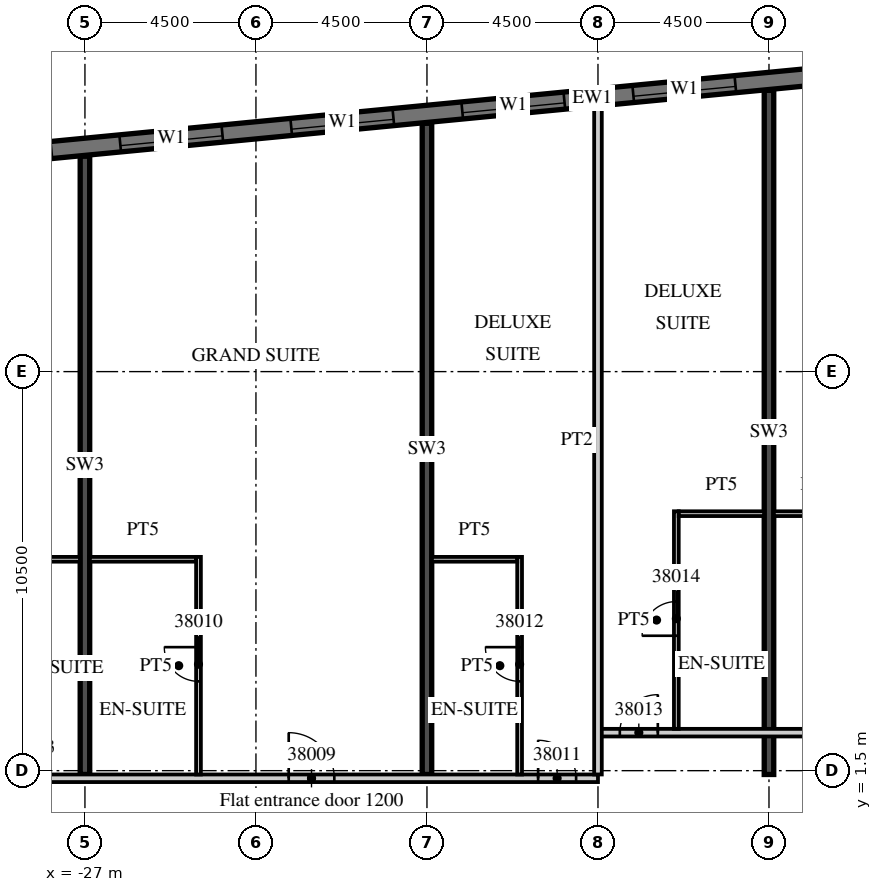
"""IFC4 building model, lengths in metres.
Left out: names, types, materials, properties, quantities, classifications, styles, units other than length and angle.
Written with IfcOpenShell. Run it as: python <this file> out.ifc"""

import sys

from ifc_helpers import new_model, si_unit, direction, frame, frame_2d, origin, place, context, subcontext, project, spatial, rectangle, extrude, element, fill, save


model = new_model("IFC4")
c1 = context("Model", 3, precision=1e-05, world=origin(), true_north=direction((0.0, 1.0)))
c2 = subcontext(c1, "Body", "Model", "MODEL_VIEW")
j1 = project(units=[si_unit("LENGTHUNIT", "METRE"), si_unit("PLANEANGLEUNIT", "RADIAN")], contexts=[c1])
p1 = place(None, origin())
s1 = spatial("IfcSite", under=j1, at=p1, CompositionType="ELEMENT")
p2 = place(p1, origin())
s2 = spatial("IfcBuilding", under=s1, at=p2, CompositionType="ELEMENT")
p3 = place(p2, frame((0.0, 0.0, 166.9)))
s3 = spatial("IfcBuildingStorey", under=s2, at=p3, CompositionType="ELEMENT", Elevation=166.9)
p4 = place(p3, frame((-27.0, 1.4, 0.0), z_axis=(0.0, 0.0, 1.0), x_axis=(0.0, 1.0, 0.0)))
e1 = element("IfcWall", 1, at=p4, inside=s3, PredefinedType="SHEAR", context=c2, shape_type="SweptSolid", body=[
    extrude(rectangle(XDim=16.268, YDim=0.25, at=frame_2d((8.134, 0.0))), origin(), (0.0, 0.0, 1.0), 3.3),
])
p5 = place(p3, frame((-18.0, 1.4, 0.0), z_axis=(0.0, 0.0, 1.0), x_axis=(0.0, 1.0, 0.0)))
e2 = element("IfcWall", 2, at=p5, inside=s3, PredefinedType="SHEAR", context=c2, shape_type="SweptSolid", body=[
    extrude(rectangle(XDim=17.134, YDim=0.25, at=frame_2d((8.567, 0.0))), origin(), (0.0, 0.0, 1.0), 3.3),
])
p6 = place(p3, frame((-9.0, 1.4, 0.0), z_axis=(0.0, 0.0, 1.0), x_axis=(0.0, 1.0, 0.0)))
e3 = element("IfcWall", 3, at=p6, inside=s3, PredefinedType="SHEAR", context=c2, shape_type="SweptSolid", body=[
    extrude(rectangle(XDim=18.001, YDim=0.25, at=frame_2d((9.0, 0.0))), origin(), (0.0, 0.0, 1.0), 3.3),
])
p7 = place(p3, frame((13.521, 21.817, 0.0), z_axis=(0.0, 0.0, 1.0), x_axis=(-0.995396508751, -0.095842529008, 0.0)))
e4 = element("IfcWall", 4, at=p7, inside=s3, PredefinedType="SOLIDWALL", context=c2, shape_type="SweptSolid", body=[
    extrude(rectangle(XDim=54.591, YDim=0.45, at=frame_2d((27.296, 0.0))), origin(), (0.0, 0.0, 1.0), 3.02),
])
p8 = place(p7, frame((0.91, 0.0, 0.45)))
e5 = element("IfcOpeningElement", 5, at=p8, cuts=e4, PredefinedType="OPENING", context=c2, shape_type="SweptSolid", body=[
    extrude(rectangle(XDim=2.7, YDim=2.25, at=frame_2d((1.35, 1.125))), frame((0.0, 0.235, 0.0), z_axis=(0.0, -1.0, 0.0), x_axis=(1.0, 0.0, 0.0)), (0.0, 0.0, 1.0), 0.47),
])
p9 = place(p7, frame((5.431, 0.0, 0.45)))
e6 = element("IfcOpeningElement", 6, at=p9, cuts=e4, PredefinedType="OPENING", context=c2, shape_type="SweptSolid", body=[
    extrude(rectangle(XDim=2.7, YDim=2.25, at=frame_2d((1.35, 1.125))), frame((0.0, 0.235, 0.0), z_axis=(0.0, -1.0, 0.0), x_axis=(1.0, 0.0, 0.0)), (0.0, 0.0, 1.0), 0.47),
])
p10 = place(p7, frame((9.952, 0.0, 0.45)))
e7 = element("IfcOpeningElement", 7, at=p10, cuts=e4, PredefinedType="OPENING", context=c2, shape_type="SweptSolid", body=[
    extrude(rectangle(XDim=2.7, YDim=2.25, at=frame_2d((1.35, 1.125))), frame((0.0, 0.235, 0.0), z_axis=(0.0, -1.0, 0.0), x_axis=(1.0, 0.0, 0.0)), (0.0, 0.0, 1.0), 0.47),
])
p11 = place(p7, frame((14.473, 0.0, 0.45)))
e8 = element("IfcOpeningElement", 8, at=p11, cuts=e4, PredefinedType="OPENING", context=c2, shape_type="SweptSolid", body=[
    extrude(rectangle(XDim=2.7, YDim=2.25, at=frame_2d((1.35, 1.125))), frame((0.0, 0.235, 0.0), z_axis=(0.0, -1.0, 0.0), x_axis=(1.0, 0.0, 0.0)), (0.0, 0.0, 1.0), 0.47),
])
p12 = place(p7, frame((18.994, 0.0, 0.45)))
e9 = element("IfcOpeningElement", 9, at=p12, cuts=e4, PredefinedType="OPENING", context=c2, shape_type="SweptSolid", body=[
    extrude(rectangle(XDim=2.7, YDim=2.25, at=frame_2d((1.35, 1.125))), frame((0.0, 0.235, 0.0), z_axis=(0.0, -1.0, 0.0), x_axis=(1.0, 0.0, 0.0)), (0.0, 0.0, 1.0), 0.47),
])
p13 = place(p7, frame((23.514, 0.0, 0.45)))
e10 = element("IfcOpeningElement", 10, at=p13, cuts=e4, PredefinedType="OPENING", context=c2, shape_type="SweptSolid", body=[
    extrude(rectangle(XDim=2.7, YDim=2.25, at=frame_2d((1.35, 1.125))), frame((0.0, 0.235, 0.0), z_axis=(0.0, -1.0, 0.0), x_axis=(1.0, 0.0, 0.0)), (0.0, 0.0, 1.0), 0.47),
])
p14 = place(p7, frame((28.035, 0.0, 0.45)))
e11 = element("IfcOpeningElement", 11, at=p14, cuts=e4, PredefinedType="OPENING", context=c2, shape_type="SweptSolid", body=[
    extrude(rectangle(XDim=2.7, YDim=2.25, at=frame_2d((1.35, 1.125))), frame((0.0, 0.235, 0.0), z_axis=(0.0, -1.0, 0.0), x_axis=(1.0, 0.0, 0.0)), (0.0, 0.0, 1.0), 0.47),
])
p15 = place(p7, frame((32.556, 0.0, 0.45)))
e12 = element("IfcOpeningElement", 12, at=p15, cuts=e4, PredefinedType="OPENING", context=c2, shape_type="SweptSolid", body=[
    extrude(rectangle(XDim=2.7, YDim=2.25, at=frame_2d((1.35, 1.125))), frame((0.0, 0.235, 0.0), z_axis=(0.0, -1.0, 0.0), x_axis=(1.0, 0.0, 0.0)), (0.0, 0.0, 1.0), 0.47),
])
p16 = place(p7, frame((37.077, 0.0, 0.45)))
e13 = element("IfcOpeningElement", 13, at=p16, cuts=e4, PredefinedType="OPENING", context=c2, shape_type="SweptSolid", body=[
    extrude(rectangle(XDim=2.7, YDim=2.25, at=frame_2d((1.35, 1.125))), frame((0.0, 0.235, 0.0), z_axis=(0.0, -1.0, 0.0), x_axis=(1.0, 0.0, 0.0)), (0.0, 0.0, 1.0), 0.47),
])
p17 = place(p7, frame((41.598, 0.0, 0.45)))
e14 = element("IfcOpeningElement", 14, at=p17, cuts=e4, PredefinedType="OPENING", context=c2, shape_type="SweptSolid", body=[
    extrude(rectangle(XDim=2.7, YDim=2.25, at=frame_2d((1.35, 1.125))), frame((0.0, 0.235, 0.0), z_axis=(0.0, -1.0, 0.0), x_axis=(1.0, 0.0, 0.0)), (0.0, 0.0, 1.0), 0.47),
])
p18 = place(p7, frame((46.118, 0.0, 0.45)))
e15 = element("IfcOpeningElement", 15, at=p18, cuts=e4, PredefinedType="OPENING", context=c2, shape_type="SweptSolid", body=[
    extrude(rectangle(XDim=2.7, YDim=2.25, at=frame_2d((1.35, 1.125))), frame((0.0, 0.235, 0.0), z_axis=(0.0, -1.0, 0.0), x_axis=(1.0, 0.0, 0.0)), (0.0, 0.0, 1.0), 0.47),
])
p19 = place(p7, frame((50.629, 0.0, 0.45)))
e16 = element("IfcOpeningElement", 16, at=p19, cuts=e4, PredefinedType="OPENING", context=c2, shape_type="SweptSolid", body=[
    extrude(rectangle(XDim=2.7, YDim=2.25, at=frame_2d((1.35, 1.125))), frame((0.0, 0.235, 0.0), z_axis=(0.0, -1.0, 0.0), x_axis=(1.0, 0.0, 0.0)), (0.0, 0.0, 1.0), 0.47),
])
p20 = place(p3, frame((-42.913, 1.3, 0.0), z_axis=(0.0, 0.0, 1.0), x_axis=(1.0, 0.0, 0.0)))
e17 = element("IfcWall", 17, at=p20, inside=s3, PredefinedType="PARTITIONING", context=c2, shape_type="SweptSolid", body=[
    extrude(rectangle(XDim=29.413, YDim=0.2, at=frame_2d((14.707, 0.0))), origin(), (0.0, 0.0, 1.0), 3.02),
])
p21 = place(p20, frame((0.15, 0.0, 0.0)))
e18 = element("IfcOpeningElement", 18, at=p21, cuts=e17, PredefinedType="OPENING", context=c2, shape_type="SweptSolid", body=[
    extrude(rectangle(XDim=0.9, YDim=2.1, at=frame_2d((0.45, 1.05))), frame((0.0, 0.11, 0.0), z_axis=(0.0, -1.0, 0.0), x_axis=(1.0, 0.0, 0.0)), (0.0, 0.0, 1.0), 0.22),
])
p22 = place(p20, frame((5.338, 0.0, 0.0)))
e19 = element("IfcOpeningElement", 19, at=p22, cuts=e17, PredefinedType="OPENING", context=c2, shape_type="SweptSolid", body=[
    extrude(rectangle(XDim=1.0, YDim=2.1, at=frame_2d((0.5, 1.05))), frame((0.0, 0.11, 0.0), z_axis=(0.0, -1.0, 0.0), x_axis=(1.0, 0.0, 0.0)), (0.0, 0.0, 1.0), 0.22),
])
p23 = place(p20, frame((7.488, 0.0, 0.0)))
e20 = element("IfcOpeningElement", 20, at=p23, cuts=e17, PredefinedType="OPENING", context=c2, shape_type="SweptSolid", body=[
    extrude(rectangle(XDim=1.0, YDim=2.1, at=frame_2d((0.5, 1.05))), frame((0.0, 0.11, 0.0), z_axis=(0.0, -1.0, 0.0), x_axis=(1.0, 0.0, 0.0)), (0.0, 0.0, 1.0), 0.22),
])
p24 = place(p20, frame((11.963, 0.0, 0.0)))
e21 = element("IfcOpeningElement", 21, at=p24, cuts=e17, PredefinedType="OPENING", context=c2, shape_type="SweptSolid", body=[
    extrude(rectangle(XDim=1.0, YDim=2.1, at=frame_2d((0.5, 1.05))), frame((0.0, 0.11, 0.0), z_axis=(0.0, -1.0, 0.0), x_axis=(1.0, 0.0, 0.0)), (0.0, 0.0, 1.0), 0.22),
])
p25 = place(p20, frame((21.275, 0.0, 0.0)))
e22 = element("IfcOpeningElement", 22, at=p25, cuts=e17, PredefinedType="OPENING", context=c2, shape_type="SweptSolid", body=[
    extrude(rectangle(XDim=1.2, YDim=2.1, at=frame_2d((0.6, 1.05))), frame((0.0, 0.11, 0.0), z_axis=(0.0, -1.0, 0.0), x_axis=(1.0, 0.0, 0.0)), (0.0, 0.0, 1.0), 0.22),
])
p26 = place(p20, frame((27.838, 0.0, 0.0)))
e23 = element("IfcOpeningElement", 23, at=p26, cuts=e17, PredefinedType="OPENING", context=c2, shape_type="SweptSolid", body=[
    extrude(rectangle(XDim=1.0, YDim=2.1, at=frame_2d((0.5, 1.05))), frame((0.0, 0.11, 0.0), z_axis=(0.0, -1.0, 0.0), x_axis=(1.0, 0.0, 0.0)), (0.0, 0.0, 1.0), 0.22),
])
p27 = place(p3, frame((-13.5, 2.5, 0.0), z_axis=(0.0, 0.0, 1.0), x_axis=(1.0, 0.0, 0.0)))
e24 = element("IfcWall", 24, at=p27, inside=s3, PredefinedType="PARTITIONING", context=c2, shape_type="SweptSolid", body=[
    extrude(rectangle(XDim=27.0, YDim=0.2, at=frame_2d((13.5, 0.0))), origin(), (0.0, 0.0, 1.0), 3.02),
])
p28 = place(p27, frame((0.575, 0.0, 0.0)))
e25 = element("IfcOpeningElement", 25, at=p28, cuts=e24, PredefinedType="OPENING", context=c2, shape_type="SweptSolid", body=[
    extrude(rectangle(XDim=1.0, YDim=2.1, at=frame_2d((0.5, 1.05))), frame((0.0, 0.11, 0.0), z_axis=(0.0, -1.0, 0.0), x_axis=(1.0, 0.0, 0.0)), (0.0, 0.0, 1.0), 0.22),
])
p29 = place(p27, frame((7.45, 0.0, 0.0)))
e26 = element("IfcOpeningElement", 26, at=p29, cuts=e24, PredefinedType="OPENING", context=c2, shape_type="SweptSolid", body=[
    extrude(rectangle(XDim=1.0, YDim=2.1, at=frame_2d((0.5, 1.05))), frame((0.0, 0.11, 0.0), z_axis=(0.0, -1.0, 0.0), x_axis=(1.0, 0.0, 0.0)), (0.0, 0.0, 1.0), 0.22),
])
p30 = place(p27, frame((11.925, 0.0, 0.0)))
e27 = element("IfcOpeningElement", 27, at=p30, cuts=e24, PredefinedType="OPENING", context=c2, shape_type="SweptSolid", body=[
    extrude(rectangle(XDim=1.0, YDim=2.1, at=frame_2d((0.5, 1.05))), frame((0.0, 0.11, 0.0), z_axis=(0.0, -1.0, 0.0), x_axis=(1.0, 0.0, 0.0)), (0.0, 0.0, 1.0), 0.22),
])
p31 = place(p27, frame((15.938, 0.0, 0.0)))
e28 = element("IfcOpeningElement", 28, at=p31, cuts=e24, PredefinedType="OPENING", context=c2, shape_type="SweptSolid", body=[
    extrude(rectangle(XDim=1.2, YDim=2.1, at=frame_2d((0.6, 1.05))), frame((0.0, 0.11, 0.0), z_axis=(0.0, -1.0, 0.0), x_axis=(1.0, 0.0, 0.0)), (0.0, 0.0, 1.0), 0.22),
])
p32 = place(p27, frame((25.425, 0.0, 0.0)))
e29 = element("IfcOpeningElement", 29, at=p32, cuts=e24, PredefinedType="OPENING", context=c2, shape_type="SweptSolid", body=[
    extrude(rectangle(XDim=1.0, YDim=2.1, at=frame_2d((0.5, 1.05))), frame((0.0, 0.11, 0.0), z_axis=(0.0, -1.0, 0.0), x_axis=(1.0, 0.0, 0.0)), (0.0, 0.0, 1.0), 0.22),
])
p33 = place(p3, frame((-29.375, 7.062, 0.0), z_axis=(0.0, 0.0, 1.0), x_axis=(1.0, 0.0, 0.0)))
e30 = element("IfcWall", 30, at=p33, inside=s3, PredefinedType="PARTITIONING", context=c2, shape_type="SweptSolid", body=[
    extrude(rectangle(XDim=2.25, YDim=0.125, at=frame_2d((1.125, 0.0))), origin(), (0.0, 0.0, 1.0), 3.02),
])
p34 = place(p3, frame((-24.012, 1.4, 0.0), z_axis=(0.0, 0.0, 1.0), x_axis=(0.0, 1.0, 0.0)))
e31 = element("IfcWall", 31, at=p34, inside=s3, PredefinedType="PARTITIONING", context=c2, shape_type="SweptSolid", body=[
    extrude(rectangle(XDim=5.725, YDim=0.125, at=frame_2d((2.863, 0.0))), origin(), (0.0, 0.0, 1.0), 3.02),
])
p35 = place(p34, frame((2.45, 0.0, 0.0)))
e32 = element("IfcOpeningElement", 32, at=p35, cuts=e31, PredefinedType="OPENING", context=c2, shape_type="SweptSolid", body=[
    extrude(rectangle(XDim=0.9, YDim=2.1, at=frame_2d((0.45, 1.05))), frame((0.0, 0.073, 0.0), z_axis=(0.0, -1.0, 0.0), x_axis=(1.0, 0.0, 0.0)), (0.0, 0.0, 1.0), 0.145),
])
p36 = place(p3, frame((-26.875, 7.062, 0.0), z_axis=(0.0, 0.0, 1.0), x_axis=(1.0, 0.0, 0.0)))
e33 = element("IfcWall", 33, at=p36, inside=s3, PredefinedType="PARTITIONING", context=c2, shape_type="SweptSolid", body=[
    extrude(rectangle(XDim=2.8, YDim=0.125, at=frame_2d((1.4, 0.0))), origin(), (0.0, 0.0, 1.0), 3.02),
])
p37 = place(p3, frame((-13.5, 1.4, 0.0), z_axis=(0.0, 0.0, 1.0), x_axis=(0.0, 1.0, 0.0)))
e34 = element("IfcWall", 34, at=p37, inside=s3, PredefinedType="PARTITIONING", context=c2, shape_type="SweptSolid", body=[
    extrude(rectangle(XDim=17.59, YDim=0.2, at=frame_2d((8.795, 0.0))), origin(), (0.0, 0.0, 1.0), 3.02),
])
p38 = place(p3, frame((-15.562, 1.4, 0.0), z_axis=(0.0, 0.0, 1.0), x_axis=(0.0, 1.0, 0.0)))
e35 = element("IfcWall", 35, at=p38, inside=s3, PredefinedType="PARTITIONING", context=c2, shape_type="SweptSolid", body=[
    extrude(rectangle(XDim=5.725, YDim=0.125, at=frame_2d((2.863, 0.0))), origin(), (0.0, 0.0, 1.0), 3.02),
])
p39 = place(p38, frame((2.45, 0.0, 0.0)))
e36 = element("IfcOpeningElement", 36, at=p39, cuts=e35, PredefinedType="OPENING", context=c2, shape_type="SweptSolid", body=[
    extrude(rectangle(XDim=0.9, YDim=2.1, at=frame_2d((0.45, 1.05))), frame((0.0, 0.073, 0.0), z_axis=(0.0, -1.0, 0.0), x_axis=(1.0, 0.0, 0.0)), (0.0, 0.0, 1.0), 0.145),
])
p40 = place(p3, frame((-17.875, 7.062, 0.0), z_axis=(0.0, 0.0, 1.0), x_axis=(1.0, 0.0, 0.0)))
e37 = element("IfcWall", 37, at=p40, inside=s3, PredefinedType="PARTITIONING", context=c2, shape_type="SweptSolid", body=[
    extrude(rectangle(XDim=2.25, YDim=0.125, at=frame_2d((1.125, 0.0))), origin(), (0.0, 0.0, 1.0), 3.02),
])
p41 = place(p3, frame((-11.438, 2.6, 0.0), z_axis=(0.0, 0.0, 1.0), x_axis=(0.0, 1.0, 0.0)))
e38 = element("IfcWall", 38, at=p41, inside=s3, PredefinedType="PARTITIONING", context=c2, shape_type="SweptSolid", body=[
    extrude(rectangle(XDim=5.725, YDim=0.125, at=frame_2d((2.862, 0.0))), origin(), (0.0, 0.0, 1.0), 3.02),
])
p42 = place(p41, frame((2.45, 0.0, 0.0)))
e39 = element("IfcOpeningElement", 39, at=p42, cuts=e38, PredefinedType="OPENING", context=c2, shape_type="SweptSolid", body=[
    extrude(rectangle(XDim=0.9, YDim=2.1, at=frame_2d((0.45, 1.05))), frame((0.0, 0.073, 0.0), z_axis=(0.0, -1.0, 0.0), x_axis=(1.0, 0.0, 0.0)), (0.0, 0.0, 1.0), 0.145),
])
for number, where, z_axis, x_axis in (
    (40, (-11.375, 8.262, 0.0), (0.0, 0.0, 1.0), (1.0, 0.0, 0.0)),
    (41, (-8.875, 8.262, 0.0), (0.0, 0.0, 1.0), (1.0, 0.0, 0.0)),
):
    element("IfcWall", number, at=place(p3, frame(where, z_axis=z_axis, x_axis=x_axis)), inside=s3, PredefinedType="PARTITIONING", context=c2, shape_type="SweptSolid", body=[
        extrude(rectangle(XDim=2.25, YDim=0.125, at=frame_2d((1.125, 0.0))), origin(), (0.0, 0.0, 1.0), 3.02),
    ])
p43 = place(p13, origin())
e42 = element("IfcWindow", 42, at=p43, inside=s3, PartitioningType="SINGLE_PANEL", PredefinedType="WINDOW", context=c2, shape_type="SweptSolid", body=[
    extrude(rectangle(XDim=2.7, YDim=2.25, at=frame_2d((1.35, 1.125))), frame((0.0, 0.09, 0.0), z_axis=(0.0, -1.0, 0.0), x_axis=(1.0, 0.0, 0.0)), (0.0, 0.0, 1.0), 0.06),
])
fill(e10, e42)
p44 = place(p14, origin())
e43 = element("IfcWindow", 43, at=p44, inside=s3, PartitioningType="SINGLE_PANEL", PredefinedType="WINDOW", context=c2, shape_type="SweptSolid", body=[
    extrude(rectangle(XDim=2.7, YDim=2.25, at=frame_2d((1.35, 1.125))), frame((0.0, 0.09, 0.0), z_axis=(0.0, -1.0, 0.0), x_axis=(1.0, 0.0, 0.0)), (0.0, 0.0, 1.0), 0.06),
])
fill(e11, e43)
p45 = place(p15, origin())
e44 = element("IfcWindow", 44, at=p45, inside=s3, PartitioningType="SINGLE_PANEL", PredefinedType="WINDOW", context=c2, shape_type="SweptSolid", body=[
    extrude(rectangle(XDim=2.7, YDim=2.25, at=frame_2d((1.35, 1.125))), frame((0.0, 0.09, 0.0), z_axis=(0.0, -1.0, 0.0), x_axis=(1.0, 0.0, 0.0)), (0.0, 0.0, 1.0), 0.06),
])
fill(e12, e44)
p46 = place(p16, origin())
e45 = element("IfcWindow", 45, at=p46, inside=s3, PartitioningType="SINGLE_PANEL", PredefinedType="WINDOW", context=c2, shape_type="SweptSolid", body=[
    extrude(rectangle(XDim=2.7, YDim=2.25, at=frame_2d((1.35, 1.125))), frame((0.0, 0.09, 0.0), z_axis=(0.0, -1.0, 0.0), x_axis=(1.0, 0.0, 0.0)), (0.0, 0.0, 1.0), 0.06),
])
fill(e13, e45)
p47 = place(p25, origin())
e46 = element("IfcDoor", 46, at=p47, inside=s3, OperationType="SINGLE_SWING_LEFT", PredefinedType="DOOR", context=c2, shape_type="SweptSolid", body=[
    extrude(rectangle(XDim=1.2, YDim=2.1, at=frame_2d((0.6, 1.05))), frame((0.0, 0.025, 0.0), z_axis=(0.0, -1.0, 0.0), x_axis=(1.0, 0.0, 0.0)), (0.0, 0.0, 1.0), 0.05),
])
fill(e22, e46)
p48 = place(p35, origin())
e47 = element("IfcDoor", 47, at=p48, inside=s3, OperationType="SINGLE_SWING_RIGHT", PredefinedType="DOOR", context=c2, shape_type="SweptSolid", body=[
    extrude(rectangle(XDim=0.9, YDim=2.1, at=frame_2d((0.45, 1.05))), frame((0.0, 0.025, 0.0), z_axis=(0.0, -1.0, 0.0), x_axis=(1.0, 0.0, 0.0)), (0.0, 0.0, 1.0), 0.05),
])
fill(e32, e47)
p49 = place(p26, origin())
e48 = element("IfcDoor", 48, at=p49, inside=s3, OperationType="SINGLE_SWING_LEFT", PredefinedType="DOOR", context=c2, shape_type="SweptSolid", body=[
    extrude(rectangle(XDim=1.0, YDim=2.1, at=frame_2d((0.5, 1.05))), frame((0.0, 0.025, 0.0), z_axis=(0.0, -1.0, 0.0), x_axis=(1.0, 0.0, 0.0)), (0.0, 0.0, 1.0), 0.05),
])
fill(e23, e48)
p50 = place(p39, origin())
e49 = element("IfcDoor", 49, at=p50, inside=s3, OperationType="SINGLE_SWING_RIGHT", PredefinedType="DOOR", context=c2, shape_type="SweptSolid", body=[
    extrude(rectangle(XDim=0.9, YDim=2.1, at=frame_2d((0.45, 1.05))), frame((0.0, 0.025, 0.0), z_axis=(0.0, -1.0, 0.0), x_axis=(1.0, 0.0, 0.0)), (0.0, 0.0, 1.0), 0.05),
])
fill(e36, e49)
p51 = place(p28, origin())
e50 = element("IfcDoor", 50, at=p51, inside=s3, OperationType="SINGLE_SWING_RIGHT", PredefinedType="DOOR", context=c2, shape_type="SweptSolid", body=[
    extrude(rectangle(XDim=1.0, YDim=2.1, at=frame_2d((0.5, 1.05))), frame((0.0, 0.025, 0.0), z_axis=(0.0, -1.0, 0.0), x_axis=(1.0, 0.0, 0.0)), (0.0, 0.0, 1.0), 0.05),
])
fill(e25, e50)
p52 = place(p42, origin())
e51 = element("IfcDoor", 51, at=p52, inside=s3, OperationType="SINGLE_SWING_LEFT", PredefinedType="DOOR", context=c2, shape_type="SweptSolid", body=[
    extrude(rectangle(XDim=0.9, YDim=2.1, at=frame_2d((0.45, 1.05))), frame((0.0, 0.025, 0.0), z_axis=(0.0, -1.0, 0.0), x_axis=(1.0, 0.0, 0.0)), (0.0, 0.0, 1.0), 0.05),
])
fill(e39, e51)
save(model, sys.argv[1])
